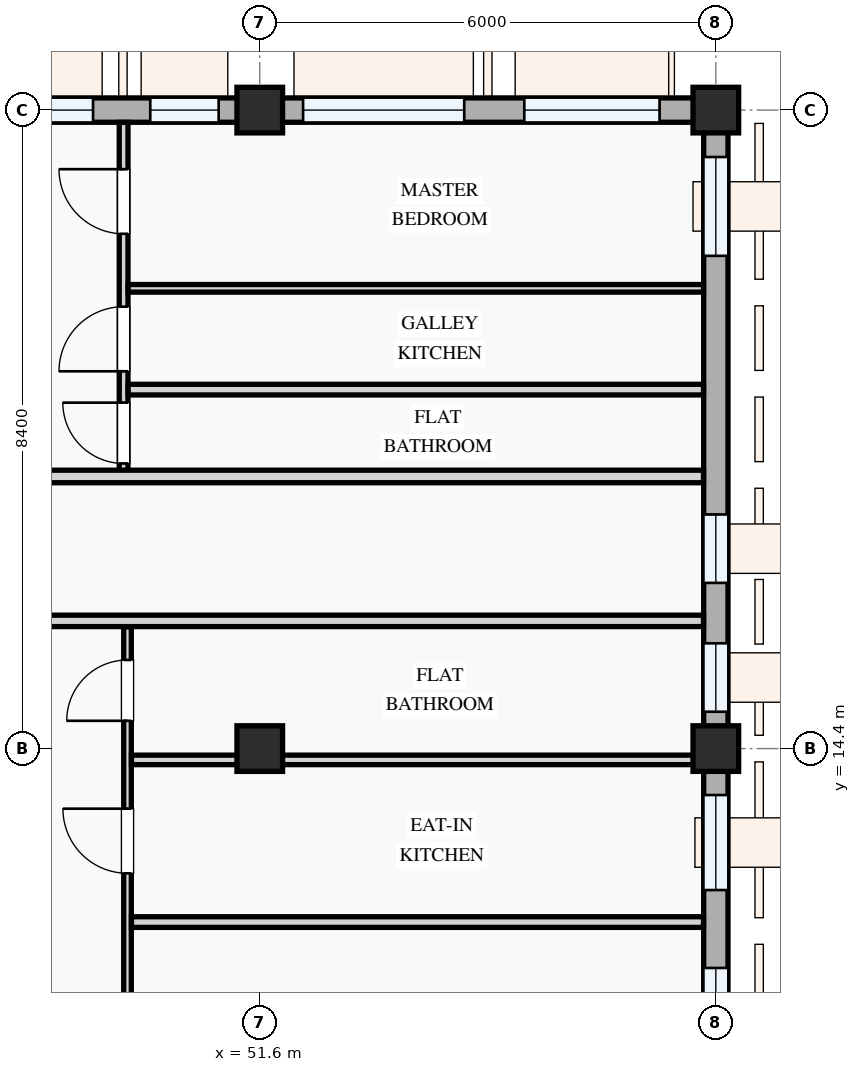
"""IFC4 building model, lengths in metres.
Left out: names, types, materials, properties, quantities, classifications, styles, units other than length and angle.
Written with IfcOpenShell. Run it as: python <this file> out.ifc"""

import sys

from ifc_helpers import new_model, si_unit, direction, frame, frame_2d, origin, origin_2d, place, context, subcontext, project, spatial, rectangle, extrude, element, fill, save


model = new_model("IFC4")
c1 = context("Model", 3, precision=1e-05, world=origin(), true_north=direction((0.0, 1.0)))
c2 = subcontext(c1, "Body", "Model", "MODEL_VIEW")
j1 = project(units=[si_unit("LENGTHUNIT", "METRE"), si_unit("PLANEANGLEUNIT", "RADIAN")], contexts=[c1])
p1 = place(None, origin())
s1 = spatial("IfcSite", under=j1, at=p1, CompositionType="ELEMENT")
p2 = place(p1, origin())
s2 = spatial("IfcBuilding", under=s1, at=p2, CompositionType="ELEMENT")
p3 = place(p2, frame((0.0, 0.0, 14.7)))
s3 = spatial("IfcBuildingStorey", under=s2, at=p3, CompositionType="ELEMENT", Elevation=14.7)
for number, where, z_axis, x_axis in (
    (1, (51.6, 14.4, 0.0), (0.0, 0.0, 1.0), (1.0, 0.0, 0.0)),
    (2, (51.6, 22.8, 0.0), (0.0, 0.0, 1.0), (1.0, 0.0, 0.0)),
    (3, (57.6, 14.4, 0.0), (0.0, 0.0, 1.0), (1.0, 0.0, 0.0)),
    (4, (57.6, 22.8, 0.0), (0.0, 0.0, 1.0), (1.0, 0.0, 0.0)),
):
    element("IfcColumn", number, at=place(p3, frame(where, z_axis=z_axis, x_axis=x_axis)), inside=s3, PredefinedType="COLUMN", context=c2, shape_type="SweptSolid", body=[
        extrude(rectangle(XDim=0.6, YDim=0.6, at=origin_2d()), origin(), (0.0, 0.0, 1.0), 3.3),
    ])
p4 = place(p3, frame((57.6, 8.4, 0.0), z_axis=(0.0, 0.0, 1.0), x_axis=(0.0, 1.0, 0.0)))
e5 = element("IfcWall", 5, at=p4, inside=s3, PredefinedType="STANDARD", context=c2, shape_type="SweptSolid", body=[
    extrude(rectangle(XDim=6.0, YDim=0.32, at=frame_2d((3.0, 0.0))), origin(), (0.0, 0.0, 1.0), 2.575),
])
p5 = place(p4, frame((0.794, 0.0, 0.78)))
e6 = element("IfcOpeningElement", 6, at=p5, cuts=e5, PredefinedType="OPENING", context=c2, shape_type="SweptSolid", body=[
    extrude(rectangle(XDim=2.32, YDim=1.5, at=frame_2d((1.16, 0.75))), frame((0.0, 0.17, 0.0), z_axis=(0.0, -1.0, 0.0), x_axis=(1.0, 0.0, 0.0)), (0.0, 0.0, 1.0), 0.34),
])
p6 = place(p4, frame((4.139, 0.0, 0.78)))
e7 = element("IfcOpeningElement", 7, at=p6, cuts=e5, PredefinedType="OPENING", context=c2, shape_type="SweptSolid", body=[
    extrude(rectangle(XDim=1.25, YDim=1.3, at=frame_2d((0.625, 0.65))), frame((0.0, 0.17, 0.0), z_axis=(0.0, -1.0, 0.0), x_axis=(1.0, 0.0, 0.0)), (0.0, 0.0, 1.0), 0.34),
])
p7 = place(p3, frame((57.6, 14.4, 0.0), z_axis=(0.0, 0.0, 1.0), x_axis=(0.0, 1.0, 0.0)))
e8 = element("IfcWall", 8, at=p7, inside=s3, PredefinedType="STANDARD", context=c2, shape_type="SweptSolid", body=[
    extrude(rectangle(XDim=8.4, YDim=0.32, at=frame_2d((4.2, 0.0))), origin(), (0.0, 0.0, 1.0), 2.425),
])
p8 = place(p7, frame((0.485, 0.0, 0.78)))
e9 = element("IfcOpeningElement", 9, at=p8, cuts=e8, PredefinedType="OPENING", context=c2, shape_type="SweptSolid", body=[
    extrude(rectangle(XDim=0.9, YDim=1.2, at=frame_2d((0.45, 0.6))), frame((0.0, 0.17, 0.0), z_axis=(0.0, -1.0, 0.0), x_axis=(1.0, 0.0, 0.0)), (0.0, 0.0, 1.0), 0.34),
])
p9 = place(p7, frame((2.18, 0.0, 0.78)))
e10 = element("IfcOpeningElement", 10, at=p9, cuts=e8, PredefinedType="OPENING", context=c2, shape_type="SweptSolid", body=[
    extrude(rectangle(XDim=0.9, YDim=1.2, at=frame_2d((0.45, 0.6))), frame((0.0, 0.17, 0.0), z_axis=(0.0, -1.0, 0.0), x_axis=(1.0, 0.0, 0.0)), (0.0, 0.0, 1.0), 0.34),
])
p10 = place(p7, frame((6.483, 0.0, 0.78)))
e11 = element("IfcOpeningElement", 11, at=p10, cuts=e8, PredefinedType="OPENING", context=c2, shape_type="SweptSolid", body=[
    extrude(rectangle(XDim=1.3, YDim=1.4, at=frame_2d((0.65, 0.7))), frame((0.0, 0.17, 0.0), z_axis=(0.0, -1.0, 0.0), x_axis=(1.0, 0.0, 0.0)), (0.0, 0.0, 1.0), 0.34),
])
p11 = place(p3, frame((57.6, 22.8, 0.0), z_axis=(0.0, 0.0, 1.0), x_axis=(-1.0, 0.0, 0.0)))
e12 = element("IfcWall", 12, at=p11, inside=s3, PredefinedType="STANDARD", context=c2, shape_type="SweptSolid", body=[
    extrude(rectangle(XDim=6.0, YDim=0.32, at=frame_2d((3.0, 0.0))), origin(), (0.0, 0.0, 1.0), 2.475),
])
p12 = place(p11, frame((0.74, 0.0, 0.78)))
e13 = element("IfcOpeningElement", 13, at=p12, cuts=e12, PredefinedType="OPENING", context=c2, shape_type="SweptSolid", body=[
    extrude(rectangle(XDim=1.78, YDim=1.42, at=frame_2d((0.89, 0.71))), frame((0.0, 0.17, 0.0), z_axis=(0.0, -1.0, 0.0), x_axis=(1.0, 0.0, 0.0)), (0.0, 0.0, 1.0), 0.34),
])
p13 = place(p11, frame((3.31, 0.0, 0.78)))
e14 = element("IfcOpeningElement", 14, at=p13, cuts=e12, PredefinedType="OPENING", context=c2, shape_type="SweptSolid", body=[
    extrude(rectangle(XDim=2.12, YDim=1.44, at=frame_2d((1.06, 0.72))), frame((0.0, 0.17, 0.0), z_axis=(0.0, -1.0, 0.0), x_axis=(1.0, 0.0, 0.0)), (0.0, 0.0, 1.0), 0.34),
])
p14 = place(p3, frame((51.6, 22.8, 0.0), z_axis=(0.0, 0.0, 1.0), x_axis=(-1.0, 0.0, 0.0)))
e15 = element("IfcWall", 15, at=p14, inside=s3, PredefinedType="STANDARD", context=c2, shape_type="SweptSolid", body=[
    extrude(rectangle(XDim=8.4, YDim=0.32, at=frame_2d((4.2, 0.0))), origin(), (0.0, 0.0, 1.0), 2.375),
])
p15 = place(p14, frame((0.541, 0.0, 0.78)))
e16 = element("IfcOpeningElement", 16, at=p15, cuts=e15, PredefinedType="OPENING", context=c2, shape_type="SweptSolid", body=[
    extrude(rectangle(XDim=0.9, YDim=1.2, at=frame_2d((0.45, 0.6))), frame((0.0, 0.17, 0.0), z_axis=(0.0, -1.0, 0.0), x_axis=(1.0, 0.0, 0.0)), (0.0, 0.0, 1.0), 0.34),
])
p16 = place(p14, frame((2.193, 0.0, 0.78)))
e17 = element("IfcOpeningElement", 17, at=p16, cuts=e15, PredefinedType="OPENING", context=c2, shape_type="SweptSolid", body=[
    extrude(rectangle(XDim=1.68, YDim=1.46, at=frame_2d((0.84, 0.73))), frame((0.0, 0.17, 0.0), z_axis=(0.0, -1.0, 0.0), x_axis=(1.0, 0.0, 0.0)), (0.0, 0.0, 1.0), 0.34),
])
p17 = place(p14, frame((4.778, 0.0, 0.78)))
e18 = element("IfcOpeningElement", 18, at=p17, cuts=e15, PredefinedType="OPENING", context=c2, shape_type="SweptSolid", body=[
    extrude(rectangle(XDim=1.2, YDim=1.35, at=frame_2d((0.6, 0.675))), frame((0.0, 0.17, 0.0), z_axis=(0.0, -1.0, 0.0), x_axis=(1.0, 0.0, 0.0)), (0.0, 0.0, 1.0), 0.34),
])
p18 = place(p14, frame((6.915, 0.0, 0.78)))
e19 = element("IfcOpeningElement", 19, at=p18, cuts=e15, PredefinedType="OPENING", context=c2, shape_type="SweptSolid", body=[
    extrude(rectangle(XDim=1.0, YDim=1.25, at=frame_2d((0.5, 0.625))), frame((0.0, 0.17, 0.0), z_axis=(0.0, -1.0, 0.0), x_axis=(1.0, 0.0, 0.0)), (0.0, 0.0, 1.0), 0.34),
])
p19 = place(p3, frame((49.86, 8.562, 0.0), z_axis=(0.0, 0.0, 1.0), x_axis=(0.0, 1.0, 0.0)))
e20 = element("IfcWall", 20, at=p19, inside=s3, PredefinedType="PARTITIONING", context=c2, shape_type="SweptSolid", body=[
    extrude(rectangle(XDim=7.441, YDim=0.1, at=frame_2d((3.72, 0.0))), origin(), (0.0, 0.0, 1.0), 3.0),
])
p20 = place(p19, frame((1.302, 0.0, 0.0)))
e21 = element("IfcOpeningElement", 21, at=p20, cuts=e20, PredefinedType="OPENING", context=c2, shape_type="SweptSolid", body=[
    extrude(rectangle(XDim=0.85, YDim=2.1, at=frame_2d((0.425, 1.05))), frame((0.0, 0.06, 0.0), z_axis=(0.0, -1.0, 0.0), x_axis=(1.0, 0.0, 0.0)), (0.0, 0.0, 1.0), 0.12),
])
p21 = place(p19, frame((4.198, 0.0, 0.0)))
e22 = element("IfcOpeningElement", 22, at=p21, cuts=e20, PredefinedType="OPENING", context=c2, shape_type="SweptSolid", body=[
    extrude(rectangle(XDim=0.85, YDim=2.1, at=frame_2d((0.425, 1.05))), frame((0.0, 0.06, 0.0), z_axis=(0.0, -1.0, 0.0), x_axis=(1.0, 0.0, 0.0)), (0.0, 0.0, 1.0), 0.12),
])
p22 = place(p19, frame((6.204, 0.0, 0.0)))
e23 = element("IfcOpeningElement", 23, at=p22, cuts=e20, PredefinedType="OPENING", context=c2, shape_type="SweptSolid", body=[
    extrude(rectangle(XDim=0.8, YDim=2.1, at=frame_2d((0.4, 1.05))), frame((0.0, 0.06, 0.0), z_axis=(0.0, -1.0, 0.0), x_axis=(1.0, 0.0, 0.0)), (0.0, 0.0, 1.0), 0.12),
])
p23 = place(p3, frame((49.912, 12.118, 0.0), z_axis=(0.0, 0.0, 1.0), x_axis=(1.0, 0.0, 0.0)))
e24 = element("IfcWall", 24, at=p23, inside=s3, PredefinedType="PARTITIONING", context=c2, shape_type="SweptSolid", body=[
    extrude(rectangle(XDim=7.526, YDim=0.14, at=frame_2d((3.763, 0.0))), origin(), (0.0, 0.0, 1.0), 3.0),
])
p24 = place(p3, frame((49.912, 14.251, 0.0), z_axis=(0.0, 0.0, 1.0), x_axis=(1.0, 0.0, 0.0)))
e25 = element("IfcWall", 25, at=p24, inside=s3, PredefinedType="PARTITIONING", context=c2, shape_type="SweptSolid", body=[
    extrude(rectangle(XDim=7.526, YDim=0.125, at=frame_2d((3.763, 0.0))), origin(), (0.0, 0.0, 1.0), 2.375),
])
p25 = place(p3, frame((49.809, 17.98, 0.0), z_axis=(0.0, 0.0, 1.0), x_axis=(0.0, 1.0, 0.0)))
e26 = element("IfcWall", 26, at=p25, inside=s3, PredefinedType="PARTITIONING", context=c2, shape_type="SweptSolid", body=[
    extrude(rectangle(XDim=4.658, YDim=0.115, at=frame_2d((2.329, 0.0))), origin(), (0.0, 0.0, 1.0), 3.0),
])
p26 = place(p25, frame((0.171, 0.0, 0.0)))
e27 = element("IfcOpeningElement", 27, at=p26, cuts=e26, PredefinedType="OPENING", context=c2, shape_type="SweptSolid", body=[
    extrude(rectangle(XDim=0.8, YDim=2.1, at=frame_2d((0.4, 1.05))), frame((0.0, 0.067, 0.0), z_axis=(0.0, -1.0, 0.0), x_axis=(1.0, 0.0, 0.0)), (0.0, 0.0, 1.0), 0.135),
])
p27 = place(p25, frame((1.384, 0.0, 0.0)))
e28 = element("IfcOpeningElement", 28, at=p27, cuts=e26, PredefinedType="OPENING", context=c2, shape_type="SweptSolid", body=[
    extrude(rectangle(XDim=0.85, YDim=2.1, at=frame_2d((0.425, 1.05))), frame((0.0, 0.067, 0.0), z_axis=(0.0, -1.0, 0.0), x_axis=(1.0, 0.0, 0.0)), (0.0, 0.0, 1.0), 0.135),
])
p28 = place(p25, frame((3.193, 0.0, 0.0)))
e29 = element("IfcOpeningElement", 29, at=p28, cuts=e26, PredefinedType="OPENING", context=c2, shape_type="SweptSolid", body=[
    extrude(rectangle(XDim=0.85, YDim=2.1, at=frame_2d((0.425, 1.05))), frame((0.0, 0.067, 0.0), z_axis=(0.0, -1.0, 0.0), x_axis=(1.0, 0.0, 0.0)), (0.0, 0.0, 1.0), 0.135),
])
p29 = place(p3, frame((49.868, 20.455, 0.0), z_axis=(0.0, 0.0, 1.0), x_axis=(1.0, 0.0, 0.0)))
e30 = element("IfcWall", 30, at=p29, inside=s3, PredefinedType="PARTITIONING", context=c2, shape_type="SweptSolid", body=[
    extrude(rectangle(XDim=7.57, YDim=0.1, at=frame_2d((3.785, 0.0))), origin(), (0.0, 0.0, 1.0), 3.0),
])
p30 = place(p3, frame((49.868, 19.122, 0.0), z_axis=(0.0, 0.0, 1.0), x_axis=(1.0, 0.0, 0.0)))
e31 = element("IfcWall", 31, at=p30, inside=s3, PredefinedType="PARTITIONING", context=c2, shape_type="SweptSolid", body=[
    extrude(rectangle(XDim=7.57, YDim=0.14, at=frame_2d((3.785, 0.0))), origin(), (0.0, 0.0, 1.0), 3.0),
])
p31 = place(p3, frame((22.66, 16.08, 0.0), z_axis=(0.0, 0.0, 1.0), x_axis=(1.0, 0.0, 0.0)))
e32 = element("IfcWall", 32, at=p31, inside=s3, PredefinedType="PARTITIONING", context=c2, shape_type="SweptSolid", body=[
    extrude(rectangle(XDim=34.778, YDim=0.15, at=frame_2d((17.389, 0.0))), origin(), (0.0, 0.0, 1.0), 3.0),
])
p32 = place(p31, frame((2.672, 0.0, 0.0)))
e33 = element("IfcOpeningElement", 33, at=p32, cuts=e32, PredefinedType="OPENING", context=c2, shape_type="SweptSolid", body=[
    extrude(rectangle(XDim=0.96, YDim=2.12, at=frame_2d((0.48, 1.06))), frame((0.0, 0.085, 0.0), z_axis=(0.0, -1.0, 0.0), x_axis=(1.0, 0.0, 0.0)), (0.0, 0.0, 1.0), 0.17),
])
p33 = place(p31, frame((10.71, 0.0, 0.0)))
e34 = element("IfcOpeningElement", 34, at=p33, cuts=e32, PredefinedType="OPENING", context=c2, shape_type="SweptSolid", body=[
    extrude(rectangle(XDim=0.92, YDim=2.1, at=frame_2d((0.46, 1.05))), frame((0.0, 0.085, 0.0), z_axis=(0.0, -1.0, 0.0), x_axis=(1.0, 0.0, 0.0)), (0.0, 0.0, 1.0), 0.17),
])
p34 = place(p31, frame((24.28, 0.0, 0.0)))
e35 = element("IfcOpeningElement", 35, at=p34, cuts=e32, PredefinedType="OPENING", context=c2, shape_type="SweptSolid", body=[
    extrude(rectangle(XDim=0.92, YDim=2.1, at=frame_2d((0.46, 1.05))), frame((0.0, 0.085, 0.0), z_axis=(0.0, -1.0, 0.0), x_axis=(1.0, 0.0, 0.0)), (0.0, 0.0, 1.0), 0.17),
])
p35 = place(p3, frame((22.66, 17.98, 0.0), z_axis=(0.0, 0.0, 1.0), x_axis=(1.0, 0.0, 0.0)))
e36 = element("IfcWall", 36, at=p35, inside=s3, PredefinedType="PARTITIONING", context=c2, shape_type="SweptSolid", body=[
    extrude(rectangle(XDim=34.778, YDim=0.165, at=frame_2d((17.389, 0.0))), origin(), (0.0, 0.0, 1.0), 3.0),
])
p36 = place(p35, frame((2.664, 0.0, 0.0)))
e37 = element("IfcOpeningElement", 37, at=p36, cuts=e36, PredefinedType="OPENING", context=c2, shape_type="SweptSolid", body=[
    extrude(rectangle(XDim=0.92, YDim=2.1, at=frame_2d((0.46, 1.05))), frame((0.0, 0.093, 0.0), z_axis=(0.0, -1.0, 0.0), x_axis=(1.0, 0.0, 0.0)), (0.0, 0.0, 1.0), 0.185),
])
p37 = place(p35, frame((10.71, 0.0, 0.0)))
e38 = element("IfcOpeningElement", 38, at=p37, cuts=e36, PredefinedType="OPENING", context=c2, shape_type="SweptSolid", body=[
    extrude(rectangle(XDim=0.92, YDim=2.1, at=frame_2d((0.46, 1.05))), frame((0.0, 0.093, 0.0), z_axis=(0.0, -1.0, 0.0), x_axis=(1.0, 0.0, 0.0)), (0.0, 0.0, 1.0), 0.185),
])
p38 = place(p35, frame((24.254, 0.0, 0.0)))
e39 = element("IfcOpeningElement", 39, at=p38, cuts=e36, PredefinedType="OPENING", context=c2, shape_type="SweptSolid", body=[
    extrude(rectangle(XDim=0.96, YDim=2.12, at=frame_2d((0.48, 1.06))), frame((0.0, 0.093, 0.0), z_axis=(0.0, -1.0, 0.0), x_axis=(1.0, 0.0, 0.0)), (0.0, 0.0, 1.0), 0.185),
])
p39 = place(p5, origin())
e40 = element("IfcWindow", 40, at=p39, inside=s3, PartitioningType="DOUBLE_PANEL_VERTICAL", PredefinedType="WINDOW", context=c2, shape_type="SweptSolid", body=[
    extrude(rectangle(XDim=2.32, YDim=1.5, at=frame_2d((1.16, 0.75))), frame((0.0, 0.03, 0.0), z_axis=(0.0, -1.0, 0.0), x_axis=(1.0, 0.0, 0.0)), (0.0, 0.0, 1.0), 0.06),
])
fill(e6, e40)
p40 = place(p6, origin())
e41 = element("IfcWindow", 41, at=p40, inside=s3, PartitioningType="SINGLE_PANEL", PredefinedType="WINDOW", context=c2, shape_type="SweptSolid", body=[
    extrude(rectangle(XDim=1.25, YDim=1.3, at=frame_2d((0.625, 0.65))), frame((0.0, 0.03, 0.0), z_axis=(0.0, -1.0, 0.0), x_axis=(1.0, 0.0, 0.0)), (0.0, 0.0, 1.0), 0.06),
])
fill(e7, e41)
p41 = place(p8, origin())
e42 = element("IfcWindow", 42, at=p41, inside=s3, PartitioningType="SINGLE_PANEL", PredefinedType="WINDOW", context=c2, shape_type="SweptSolid", body=[
    extrude(rectangle(XDim=0.9, YDim=1.2, at=frame_2d((0.45, 0.6))), frame((0.0, 0.03, 0.0), z_axis=(0.0, -1.0, 0.0), x_axis=(1.0, 0.0, 0.0)), (0.0, 0.0, 1.0), 0.06),
])
fill(e9, e42)
p42 = place(p9, origin())
e43 = element("IfcWindow", 43, at=p42, inside=s3, PartitioningType="SINGLE_PANEL", PredefinedType="WINDOW", context=c2, shape_type="SweptSolid", body=[
    extrude(rectangle(XDim=0.9, YDim=1.2, at=frame_2d((0.45, 0.6))), frame((0.0, 0.03, 0.0), z_axis=(0.0, -1.0, 0.0), x_axis=(1.0, 0.0, 0.0)), (0.0, 0.0, 1.0), 0.06),
])
fill(e10, e43)
p43 = place(p10, origin())
e44 = element("IfcWindow", 44, at=p43, inside=s3, PartitioningType="SINGLE_PANEL", PredefinedType="WINDOW", context=c2, shape_type="SweptSolid", body=[
    extrude(rectangle(XDim=1.3, YDim=1.4, at=frame_2d((0.65, 0.7))), frame((0.0, 0.03, 0.0), z_axis=(0.0, -1.0, 0.0), x_axis=(1.0, 0.0, 0.0)), (0.0, 0.0, 1.0), 0.06),
])
fill(e11, e44)
p44 = place(p12, origin())
e45 = element("IfcWindow", 45, at=p44, inside=s3, PartitioningType="DOUBLE_PANEL_VERTICAL", PredefinedType="WINDOW", context=c2, shape_type="SweptSolid", body=[
    extrude(rectangle(XDim=1.78, YDim=1.42, at=frame_2d((0.89, 0.71))), frame((0.0, 0.03, 0.0), z_axis=(0.0, -1.0, 0.0), x_axis=(1.0, 0.0, 0.0)), (0.0, 0.0, 1.0), 0.06),
])
fill(e13, e45)
p45 = place(p13, origin())
e46 = element("IfcWindow", 46, at=p45, inside=s3, PartitioningType="DOUBLE_PANEL_VERTICAL", PredefinedType="WINDOW", context=c2, shape_type="SweptSolid", body=[
    extrude(rectangle(XDim=2.12, YDim=1.44, at=frame_2d((1.06, 0.72))), frame((0.0, 0.03, 0.0), z_axis=(0.0, -1.0, 0.0), x_axis=(1.0, 0.0, 0.0)), (0.0, 0.0, 1.0), 0.06),
])
fill(e14, e46)
p46 = place(p15, origin())
e47 = element("IfcWindow", 47, at=p46, inside=s3, PartitioningType="SINGLE_PANEL", PredefinedType="WINDOW", context=c2, shape_type="SweptSolid", body=[
    extrude(rectangle(XDim=0.9, YDim=1.2, at=frame_2d((0.45, 0.6))), frame((0.0, 0.03, 0.0), z_axis=(0.0, -1.0, 0.0), x_axis=(1.0, 0.0, 0.0)), (0.0, 0.0, 1.0), 0.06),
])
fill(e16, e47)
p47 = place(p16, origin())
e48 = element("IfcWindow", 48, at=p47, inside=s3, PartitioningType="DOUBLE_PANEL_VERTICAL", PredefinedType="WINDOW", context=c2, shape_type="SweptSolid", body=[
    extrude(rectangle(XDim=1.68, YDim=1.46, at=frame_2d((0.84, 0.73))), frame((0.0, 0.03, 0.0), z_axis=(0.0, -1.0, 0.0), x_axis=(1.0, 0.0, 0.0)), (0.0, 0.0, 1.0), 0.06),
])
fill(e17, e48)
p48 = place(p21, origin())
e49 = element("IfcDoor", 49, at=p48, inside=s3, OperationType="SINGLE_SWING_RIGHT", PredefinedType="DOOR", context=c2, shape_type="SweptSolid", body=[
    extrude(rectangle(XDim=0.85, YDim=2.1, at=frame_2d((0.425, 1.05))), frame((0.0, 0.025, 0.0), z_axis=(0.0, -1.0, 0.0), x_axis=(1.0, 0.0, 0.0)), (0.0, 0.0, 1.0), 0.05),
])
fill(e22, e49)
p49 = place(p22, origin())
e50 = element("IfcDoor", 50, at=p49, inside=s3, OperationType="SINGLE_SWING_LEFT", PredefinedType="DOOR", context=c2, shape_type="SweptSolid", body=[
    extrude(rectangle(XDim=0.8, YDim=2.1, at=frame_2d((0.4, 1.05))), frame((0.0, 0.025, 0.0), z_axis=(0.0, -1.0, 0.0), x_axis=(1.0, 0.0, 0.0)), (0.0, 0.0, 1.0), 0.05),
])
fill(e23, e50)
p50 = place(p26, origin())
e51 = element("IfcDoor", 51, at=p50, inside=s3, OperationType="SINGLE_SWING_RIGHT", PredefinedType="DOOR", context=c2, shape_type="SweptSolid", body=[
    extrude(rectangle(XDim=0.8, YDim=2.1, at=frame_2d((0.4, 1.05))), frame((0.0, 0.025, 0.0), z_axis=(0.0, -1.0, 0.0), x_axis=(1.0, 0.0, 0.0)), (0.0, 0.0, 1.0), 0.05),
])
fill(e27, e51)
p51 = place(p27, origin())
e52 = element("IfcDoor", 52, at=p51, inside=s3, OperationType="SINGLE_SWING_LEFT", PredefinedType="DOOR", context=c2, shape_type="SweptSolid", body=[
    extrude(rectangle(XDim=0.85, YDim=2.1, at=frame_2d((0.425, 1.05))), frame((0.0, 0.025, 0.0), z_axis=(0.0, -1.0, 0.0), x_axis=(1.0, 0.0, 0.0)), (0.0, 0.0, 1.0), 0.05),
])
fill(e28, e52)
p52 = place(p28, origin())
e53 = element("IfcDoor", 53, at=p52, inside=s3, OperationType="SINGLE_SWING_RIGHT", PredefinedType="DOOR", context=c2, shape_type="SweptSolid", body=[
    extrude(rectangle(XDim=0.85, YDim=2.1, at=frame_2d((0.425, 1.05))), frame((0.0, 0.025, 0.0), z_axis=(0.0, -1.0, 0.0), x_axis=(1.0, 0.0, 0.0)), (0.0, 0.0, 1.0), 0.05),
])
fill(e29, e53)
save(model, sys.argv[1])
